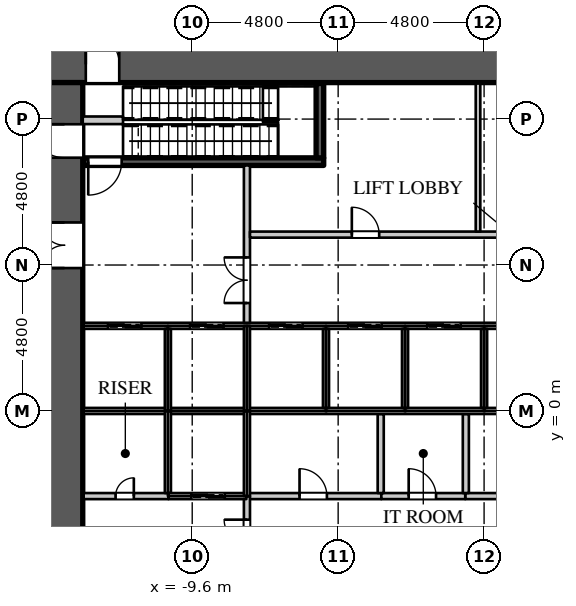
"""IFC4 building model, lengths in metres.
Left out: names, types, materials, properties, quantities, classifications, styles, units other than length and angle.
Written with IfcOpenShell. Run it as: python <this file> out.ifc"""

import sys

from ifc_helpers import new_model, si_unit, direction, frame, frame_2d, origin, place, context, subcontext, project, spatial, rectangle, extrude, element, fill, save


model = new_model("IFC4")
c1 = context("Model", 3, precision=1e-05, world=origin(), true_north=direction((0.0, 1.0)))
c2 = subcontext(c1, "Body", "Model", "MODEL_VIEW")
j1 = project(units=[si_unit("LENGTHUNIT", "METRE"), si_unit("PLANEANGLEUNIT", "RADIAN")], contexts=[c1])
p1 = place(None, origin())
s1 = spatial("IfcSite", under=j1, at=p1, CompositionType="ELEMENT")
p2 = place(p1, origin())
s2 = spatial("IfcBuilding", under=s1, at=p2, CompositionType="ELEMENT")
p3 = place(p2, origin())
s3 = spatial("IfcBuildingStorey", under=s2, at=p3, CompositionType="ELEMENT", Elevation=0.0)
p4 = place(p3, frame((-14.4, 11.4, 0.0), z_axis=(0.0, 0.0, 1.0), x_axis=(1.0, 0.0, 0.0)))
e1 = element("IfcWall", 1, at=p4, inside=s3, PredefinedType="SHEAR", context=c2, shape_type="SweptSolid", body=[
    extrude(rectangle(XDim=28.8, YDim=1.2, at=frame_2d((14.4, 0.0))), origin(), (0.0, 0.0, 1.0), 6.0),
])
p5 = place(p4, frame((1.3, 0.0, 0.0)))
e2 = element("IfcOpeningElement", 2, at=p5, cuts=e1, PredefinedType="OPENING", context=c2, shape_type="SweptSolid", body=[
    extrude(rectangle(XDim=1.1, YDim=2.2, at=frame_2d((0.55, 1.1))), frame((0.0, 0.61, 0.0), z_axis=(0.0, -1.0, 0.0), x_axis=(1.0, 0.0, 0.0)), (0.0, 0.0, 1.0), 1.22),
])
p6 = place(p4, frame((26.4, 0.0, 0.0)))
e3 = element("IfcOpeningElement", 3, at=p6, cuts=e1, PredefinedType="OPENING", context=c2, shape_type="SweptSolid", body=[
    extrude(rectangle(XDim=1.1, YDim=2.2, at=frame_2d((0.55, 1.1))), frame((0.0, 0.61, 0.0), z_axis=(0.0, -1.0, 0.0), x_axis=(1.0, 0.0, 0.0)), (0.0, 0.0, 1.0), 1.22),
])
p7 = place(p3, frame((-13.8, -10.8, 0.0), z_axis=(0.0, 0.0, 1.0), x_axis=(0.0, 1.0, 0.0)))
e4 = element("IfcWall", 4, at=p7, inside=s3, PredefinedType="SHEAR", context=c2, shape_type="SweptSolid", body=[
    extrude(rectangle(XDim=21.6, YDim=1.2, at=frame_2d((10.8, 0.0))), origin(), (0.0, 0.0, 1.0), 6.0),
])
p8 = place(p7, frame((15.5, 0.0, 0.0)))
e5 = element("IfcOpeningElement", 5, at=p8, cuts=e4, PredefinedType="OPENING", context=c2, shape_type="SweptSolid", body=[
    extrude(rectangle(XDim=1.5, YDim=2.4, at=frame_2d((0.75, 1.2))), frame((0.0, 0.61, 0.0), z_axis=(0.0, -1.0, 0.0), x_axis=(1.0, 0.0, 0.0)), (0.0, 0.0, 1.0), 1.22),
])
p9 = place(p7, frame((4.5, 0.0, 0.0)))
e6 = element("IfcOpeningElement", 6, at=p9, cuts=e4, PredefinedType="OPENING", context=c2, shape_type="SweptSolid", body=[
    extrude(rectangle(XDim=1.5, YDim=2.4, at=frame_2d((0.75, 1.2))), frame((0.0, 0.61, 0.0), z_axis=(0.0, -1.0, 0.0), x_axis=(1.0, 0.0, 0.0)), (0.0, 0.0, 1.0), 1.22),
])
p10 = place(p7, frame((19.13, 0.0, 0.0)))
e7 = element("IfcOpeningElement", 7, at=p10, cuts=e4, PredefinedType="OPENING", context=c2, shape_type="SweptSolid", body=[
    extrude(rectangle(XDim=1.1, YDim=2.2, at=frame_2d((0.55, 1.1))), frame((0.0, 0.61, 0.0), z_axis=(0.0, -1.0, 0.0), x_axis=(1.0, 0.0, 0.0)), (0.0, 0.0, 1.0), 1.22),
])
p11 = place(p3, frame((-7.82, -2.8, 0.0), z_axis=(0.0, 0.0, 1.0), x_axis=(1.0, 0.0, 0.0)))
e8 = element("IfcWall", 8, at=p11, inside=s3, PredefinedType="PARTITIONING", context=c2, shape_type="SweptSolid", body=[
    extrude(rectangle(XDim=4.44, YDim=0.2, at=frame_2d((2.22, 0.0))), origin(), (0.0, 0.0, 1.0), 5.65),
])
p12 = place(p11, frame((1.75, 0.0, 0.0)))
e9 = element("IfcOpeningElement", 9, at=p12, cuts=e8, PredefinedType="OPENING", context=c2, shape_type="SweptSolid", body=[
    extrude(rectangle(XDim=0.9, YDim=2.2, at=frame_2d((0.45, 1.1))), frame((0.0, 0.11, 0.0), z_axis=(0.0, -1.0, 0.0), x_axis=(1.0, 0.0, 0.0)), (0.0, 0.0, 1.0), 0.22),
])
p13 = place(p3, frame((-7.8, -8.075, 0.0), z_axis=(0.0, 0.0, 1.0), x_axis=(0.0, 1.0, 0.0)))
e10 = element("IfcWall", 10, at=p13, inside=s3, PredefinedType="PARTITIONING", context=c2, shape_type="SweptSolid", body=[
    extrude(rectangle(XDim=5.275, YDim=0.2, at=frame_2d((2.637, 0.0))), origin(), (0.0, 0.0, 1.0), 5.65),
])
p14 = place(p13, frame((3.0, 0.0, 0.0)))
e11 = element("IfcOpeningElement", 11, at=p14, cuts=e10, PredefinedType="OPENING", context=c2, shape_type="SweptSolid", body=[
    extrude(rectangle(XDim=1.5, YDim=2.4, at=frame_2d((0.75, 1.2))), frame((0.0, 0.11, 0.0), z_axis=(0.0, -1.0, 0.0), x_axis=(1.0, 0.0, 0.0)), (0.0, 0.0, 1.0), 0.22),
])
p15 = place(p3, frame((-7.8, 2.8, 0.0), z_axis=(0.0, 0.0, 1.0), x_axis=(0.0, 1.0, 0.0)))
e12 = element("IfcWall", 12, at=p15, inside=s3, PredefinedType="PARTITIONING", context=c2, shape_type="SweptSolid", body=[
    extrude(rectangle(XDim=5.275, YDim=0.2, at=frame_2d((2.637, 0.0))), origin(), (0.0, 0.0, 1.0), 5.65),
])
p16 = place(p15, frame((0.75, 0.0, 0.0)))
e13 = element("IfcOpeningElement", 13, at=p16, cuts=e12, PredefinedType="OPENING", context=c2, shape_type="SweptSolid", body=[
    extrude(rectangle(XDim=1.5, YDim=2.4, at=frame_2d((0.75, 1.2))), frame((0.0, 0.11, 0.0), z_axis=(0.0, -1.0, 0.0), x_axis=(1.0, 0.0, 0.0)), (0.0, 0.0, 1.0), 0.22),
])
p17 = place(p3, frame((-7.7, 5.8, 0.0), z_axis=(0.0, 0.0, 1.0), x_axis=(1.0, 0.0, 0.0)))
e14 = element("IfcWall", 14, at=p17, inside=s3, PredefinedType="PARTITIONING", context=c2, shape_type="SweptSolid", body=[
    extrude(rectangle(XDim=20.87, YDim=0.2, at=frame_2d((10.435, 0.0))), origin(), (0.0, 0.0, 1.0), 5.65),
])
p18 = place(p17, frame((3.35, 0.0, 0.0)))
e15 = element("IfcOpeningElement", 15, at=p18, cuts=e14, PredefinedType="OPENING", context=c2, shape_type="SweptSolid", body=[
    extrude(rectangle(XDim=0.9, YDim=2.2, at=frame_2d((0.45, 1.1))), frame((0.0, 0.11, 0.0), z_axis=(0.0, -1.0, 0.0), x_axis=(1.0, 0.0, 0.0)), (0.0, 0.0, 1.0), 0.22),
])
p19 = place(p17, frame((9.5, 0.0, 0.0)))
e16 = element("IfcOpeningElement", 16, at=p19, cuts=e14, PredefinedType="OPENING", context=c2, shape_type="SweptSolid", body=[
    extrude(rectangle(XDim=0.9, YDim=2.2, at=frame_2d((0.45, 1.1))), frame((0.0, 0.11, 0.0), z_axis=(0.0, -1.0, 0.0), x_axis=(1.0, 0.0, 0.0)), (0.0, 0.0, 1.0), 0.22),
])
p20 = place(p17, frame((16.15, 0.0, 0.0)))
e17 = element("IfcOpeningElement", 17, at=p20, cuts=e14, PredefinedType="OPENING", context=c2, shape_type="SweptSolid", body=[
    extrude(rectangle(XDim=0.9, YDim=2.2, at=frame_2d((0.45, 1.1))), frame((0.0, 0.11, 0.0), z_axis=(0.0, -1.0, 0.0), x_axis=(1.0, 0.0, 0.0)), (0.0, 0.0, 1.0), 0.22),
])
p21 = place(p3, frame((-0.62, -2.8, 0.0), z_axis=(0.0, 0.0, 1.0), x_axis=(1.0, 0.0, 0.0)))
e18 = element("IfcWall", 18, at=p21, inside=s3, PredefinedType="PARTITIONING", context=c2, shape_type="SweptSolid", body=[
    extrude(rectangle(XDim=8.44, YDim=0.2, at=frame_2d((4.22, 0.0))), origin(), (0.0, 0.0, 1.0), 5.65),
])
p22 = place(p21, frame((2.15, 0.0, 0.0)))
e19 = element("IfcOpeningElement", 19, at=p22, cuts=e18, PredefinedType="OPENING", context=c2, shape_type="SweptSolid", body=[
    extrude(rectangle(XDim=0.9, YDim=2.2, at=frame_2d((0.45, 1.1))), frame((0.0, 0.11, 0.0), z_axis=(0.0, -1.0, 0.0), x_axis=(1.0, 0.0, 0.0)), (0.0, 0.0, 1.0), 0.22),
])
p23 = place(p21, frame((6.2, 0.0, 0.0)))
e20 = element("IfcOpeningElement", 20, at=p23, cuts=e18, PredefinedType="OPENING", context=c2, shape_type="SweptSolid", body=[
    extrude(rectangle(XDim=0.9, YDim=2.2, at=frame_2d((0.45, 1.1))), frame((0.0, 0.11, 0.0), z_axis=(0.0, -1.0, 0.0), x_axis=(1.0, 0.0, 0.0)), (0.0, 0.0, 1.0), 0.22),
])
p24 = place(p3, frame((-0.2, 5.9, 0.0), z_axis=(0.0, 0.0, 1.0), x_axis=(0.0, 1.0, 0.0)))
e21 = element("IfcWall", 21, at=p24, inside=s3, PredefinedType="PARTITIONING", context=c2, shape_type="SweptSolid", body=[
    extrude(rectangle(XDim=4.87, YDim=0.15, at=frame_2d((2.435, 0.0))), origin(), (0.0, 0.0, 1.0), 5.65),
])
p25 = place(p3, frame((-13.17, -2.8, 0.0), z_axis=(0.0, 0.0, 1.0), x_axis=(1.0, 0.0, 0.0)))
e22 = element("IfcWall", 22, at=p25, inside=s3, PredefinedType="PARTITIONING", context=c2, shape_type="SweptSolid", body=[
    extrude(rectangle(XDim=2.79, YDim=0.2, at=frame_2d((1.395, 0.0))), origin(), (0.0, 0.0, 1.0), 5.65),
])
p26 = place(p25, frame((1.05, 0.0, 0.0)))
e23 = element("IfcOpeningElement", 23, at=p26, cuts=e22, PredefinedType="OPENING", context=c2, shape_type="SweptSolid", body=[
    extrude(rectangle(XDim=0.6, YDim=2.0, at=frame_2d((0.3, 1.0))), frame((0.0, 0.11, 0.0), z_axis=(0.0, -1.0, 0.0), x_axis=(1.0, 0.0, 0.0)), (0.0, 0.0, 1.0), 0.22),
])
p27 = place(p3, frame((-3.38, -2.8, 0.0), z_axis=(0.0, 0.0, 1.0), x_axis=(1.0, 0.0, 0.0)))
e24 = element("IfcWall", 24, at=p27, inside=s3, PredefinedType="PARTITIONING", context=c2, shape_type="SweptSolid", body=[
    extrude(rectangle(XDim=2.76, YDim=0.2, at=frame_2d((1.38, 0.0))), origin(), (0.0, 0.0, 1.0), 5.65),
])
p28 = place(p27, frame((0.9, 0.0, 0.0)))
e25 = element("IfcOpeningElement", 25, at=p28, cuts=e24, PredefinedType="OPENING", context=c2, shape_type="SweptSolid", body=[
    extrude(rectangle(XDim=0.9, YDim=2.2, at=frame_2d((0.45, 1.1))), frame((0.0, 0.11, 0.0), z_axis=(0.0, -1.0, 0.0), x_axis=(1.0, 0.0, 0.0)), (0.0, 0.0, 1.0), 0.22),
])
for number, where, z_axis, x_axis in (
    (26, (-3.4, -2.7, 0.0), (0.0, 0.0, 1.0), (0.0, 1.0, 0.0)),
    (27, (-0.6, -2.7, 0.0), (0.0, 0.0, 1.0), (0.0, 1.0, 0.0)),
):
    element("IfcWall", number, at=place(p3, frame(where, z_axis=z_axis, x_axis=x_axis)), inside=s3, PredefinedType="PARTITIONING", context=c2, shape_type="SweptSolid", body=[
        extrude(rectangle(XDim=2.6, YDim=0.2, at=frame_2d((1.3, 0.0))), origin(), (0.0, 0.0, 1.0), 5.65),
    ])
p29 = place(p3, frame((-13.17, 0.0, 0.0), z_axis=(0.0, 0.0, 1.0), x_axis=(1.0, 0.0, 0.0)))
e28 = element("IfcWall", 28, at=p29, inside=s3, PredefinedType="PARTITIONING", context=c2, shape_type="SweptSolid", body=[
    extrude(rectangle(XDim=23.57, YDim=0.2, at=frame_2d((11.785, 0.0))), origin(), (0.0, 0.0, 1.0), 5.65),
])
p30 = place(p3, frame((-13.17, 2.8, 0.0), z_axis=(0.0, 0.0, 1.0), x_axis=(1.0, 0.0, 0.0)))
e29 = element("IfcWall", 29, at=p30, inside=s3, PredefinedType="PARTITIONING", context=c2, shape_type="SweptSolid", body=[
    extrude(rectangle(XDim=23.57, YDim=0.2, at=frame_2d((11.785, 0.0))), origin(), (0.0, 0.0, 1.0), 5.65),
])
p31 = place(p30, frame((0.8, 0.0, 0.0)))
e30 = element("IfcOpeningElement", 30, at=p31, cuts=e29, PredefinedType="OPENING", context=c2, shape_type="SweptSolid", body=[
    extrude(rectangle(XDim=1.1, YDim=2.2, at=frame_2d((0.55, 1.1))), frame((0.0, 0.11, 0.0), z_axis=(0.0, -1.0, 0.0), x_axis=(1.0, 0.0, 0.0)), (0.0, 0.0, 1.0), 0.22),
])
p32 = place(p30, frame((3.5, 0.0, 0.0)))
e31 = element("IfcOpeningElement", 31, at=p32, cuts=e29, PredefinedType="OPENING", context=c2, shape_type="SweptSolid", body=[
    extrude(rectangle(XDim=1.1, YDim=2.2, at=frame_2d((0.55, 1.1))), frame((0.0, 0.11, 0.0), z_axis=(0.0, -1.0, 0.0), x_axis=(1.0, 0.0, 0.0)), (0.0, 0.0, 1.0), 0.22),
])
p33 = place(p30, frame((6.1, 0.0, 0.0)))
e32 = element("IfcOpeningElement", 32, at=p33, cuts=e29, PredefinedType="OPENING", context=c2, shape_type="SweptSolid", body=[
    extrude(rectangle(XDim=1.1, YDim=2.2, at=frame_2d((0.55, 1.1))), frame((0.0, 0.11, 0.0), z_axis=(0.0, -1.0, 0.0), x_axis=(1.0, 0.0, 0.0)), (0.0, 0.0, 1.0), 0.22),
])
p34 = place(p30, frame((8.7, 0.0, 0.0)))
e33 = element("IfcOpeningElement", 33, at=p34, cuts=e29, PredefinedType="OPENING", context=c2, shape_type="SweptSolid", body=[
    extrude(rectangle(XDim=1.1, YDim=2.2, at=frame_2d((0.55, 1.1))), frame((0.0, 0.11, 0.0), z_axis=(0.0, -1.0, 0.0), x_axis=(1.0, 0.0, 0.0)), (0.0, 0.0, 1.0), 0.22),
])
p35 = place(p30, frame((11.3, 0.0, 0.0)))
e34 = element("IfcOpeningElement", 34, at=p35, cuts=e29, PredefinedType="OPENING", context=c2, shape_type="SweptSolid", body=[
    extrude(rectangle(XDim=1.1, YDim=2.2, at=frame_2d((0.55, 1.1))), frame((0.0, 0.11, 0.0), z_axis=(0.0, -1.0, 0.0), x_axis=(1.0, 0.0, 0.0)), (0.0, 0.0, 1.0), 0.22),
])
p36 = place(p30, frame((13.9, 0.0, 0.0)))
e35 = element("IfcOpeningElement", 35, at=p36, cuts=e29, PredefinedType="OPENING", context=c2, shape_type="SweptSolid", body=[
    extrude(rectangle(XDim=1.1, YDim=2.2, at=frame_2d((0.55, 1.1))), frame((0.0, 0.11, 0.0), z_axis=(0.0, -1.0, 0.0), x_axis=(1.0, 0.0, 0.0)), (0.0, 0.0, 1.0), 0.22),
])
p37 = place(p30, frame((16.5, 0.0, 0.0)))
e36 = element("IfcOpeningElement", 36, at=p37, cuts=e29, PredefinedType="OPENING", context=c2, shape_type="SweptSolid", body=[
    extrude(rectangle(XDim=1.1, YDim=2.2, at=frame_2d((0.55, 1.1))), frame((0.0, 0.11, 0.0), z_axis=(0.0, -1.0, 0.0), x_axis=(1.0, 0.0, 0.0)), (0.0, 0.0, 1.0), 0.22),
])
p38 = place(p30, frame((19.1, 0.0, 0.0)))
e37 = element("IfcOpeningElement", 37, at=p38, cuts=e29, PredefinedType="OPENING", context=c2, shape_type="SweptSolid", body=[
    extrude(rectangle(XDim=1.1, YDim=2.2, at=frame_2d((0.55, 1.1))), frame((0.0, 0.11, 0.0), z_axis=(0.0, -1.0, 0.0), x_axis=(1.0, 0.0, 0.0)), (0.0, 0.0, 1.0), 0.22),
])
p39 = place(p30, frame((21.7, 0.0, 0.0)))
e38 = element("IfcOpeningElement", 38, at=p39, cuts=e29, PredefinedType="OPENING", context=c2, shape_type="SweptSolid", body=[
    extrude(rectangle(XDim=1.1, YDim=2.2, at=frame_2d((0.55, 1.1))), frame((0.0, 0.11, 0.0), z_axis=(0.0, -1.0, 0.0), x_axis=(1.0, 0.0, 0.0)), (0.0, 0.0, 1.0), 0.22),
])
p40 = place(p3, frame((-10.4, -2.7, 0.0), z_axis=(0.0, 0.0, 1.0), x_axis=(0.0, 1.0, 0.0)))
e39 = element("IfcWall", 39, at=p40, inside=s3, PredefinedType="PARTITIONING", context=c2, shape_type="SweptSolid", body=[
    extrude(rectangle(XDim=2.7, YDim=0.2, at=frame_2d((1.35, 0.0))), origin(), (0.0, 0.0, 1.0), 5.65),
])
p41 = place(p3, frame((-10.38, -2.8, 0.0), z_axis=(0.0, 0.0, 1.0), x_axis=(1.0, 0.0, 0.0)))
e40 = element("IfcWall", 40, at=p41, inside=s3, PredefinedType="PARTITIONING", context=c2, shape_type="SweptSolid", body=[
    extrude(rectangle(XDim=2.56, YDim=0.2, at=frame_2d((1.28, 0.0))), origin(), (0.0, 0.0, 1.0), 5.65),
])
p42 = place(p41, frame((0.75, 0.0, 0.0)))
e41 = element("IfcOpeningElement", 41, at=p42, cuts=e40, PredefinedType="OPENING", context=c2, shape_type="SweptSolid", body=[
    extrude(rectangle(XDim=1.1, YDim=2.2, at=frame_2d((0.55, 1.1))), frame((0.0, 0.11, 0.0), z_axis=(0.0, -1.0, 0.0), x_axis=(1.0, 0.0, 0.0)), (0.0, 0.0, 1.0), 0.22),
])
p43 = place(p3, frame((-10.4, 0.0, 0.0), z_axis=(0.0, 0.0, 1.0), x_axis=(0.0, 1.0, 0.0)))
e42 = element("IfcWall", 42, at=p43, inside=s3, PredefinedType="PARTITIONING", context=c2, shape_type="SweptSolid", body=[
    extrude(rectangle(XDim=2.7, YDim=0.2, at=frame_2d((1.35, 0.0))), origin(), (0.0, 0.0, 1.0), 5.65),
])
for number, where, z_axis, x_axis in (
    (43, (-7.8, -2.8, 0.0), (0.0, 0.0, 1.0), (0.0, 1.0, 0.0)),
    (44, (-7.8, 0.0, 0.0), (0.0, 0.0, 1.0), (0.0, 1.0, 0.0)),
):
    element("IfcWall", number, at=place(p3, frame(where, z_axis=z_axis, x_axis=x_axis)), inside=s3, PredefinedType="PARTITIONING", context=c2, shape_type="SweptSolid", body=[
        extrude(rectangle(XDim=2.8, YDim=0.2, at=frame_2d((1.4, 0.0))), origin(), (0.0, 0.0, 1.0), 5.65),
    ])
for number, where, z_axis, x_axis in (
    (45, (-5.2, 0.1, 0.0), (0.0, 0.0, 1.0), (0.0, 1.0, 0.0)),
    (46, (-2.6, 0.1, 0.0), (0.0, 0.0, 1.0), (0.0, 1.0, 0.0)),
    (47, (0.0, 0.1, 0.0), (0.0, 0.0, 1.0), (0.0, 1.0, 0.0)),
):
    element("IfcWall", number, at=place(p3, frame(where, z_axis=z_axis, x_axis=x_axis)), inside=s3, PredefinedType="PARTITIONING", context=c2, shape_type="SweptSolid", body=[
        extrude(rectangle(XDim=2.6, YDim=0.2, at=frame_2d((1.3, 0.0))), origin(), (0.0, 0.0, 1.0), 5.65),
    ])
p44 = place(p3, frame((-13.17, 8.2, 0.0), z_axis=(0.0, 0.0, 1.0), x_axis=(1.0, 0.0, 0.0)))
e48 = element("IfcWall", 48, at=p44, inside=s3, PredefinedType="SHEAR", context=c2, shape_type="SweptSolid", body=[
    extrude(rectangle(XDim=7.895, YDim=0.25, at=frame_2d((3.948, 0.0))), origin(), (0.0, 0.0, 1.0), 5.65),
])
p45 = place(p44, frame((0.15, 0.0, 0.0)))
e49 = element("IfcOpeningElement", 49, at=p45, cuts=e48, PredefinedType="OPENING", context=c2, shape_type="SweptSolid", body=[
    extrude(rectangle(XDim=1.1, YDim=2.2, at=frame_2d((0.55, 1.1))), frame((0.0, 0.135, 0.0), z_axis=(0.0, -1.0, 0.0), x_axis=(1.0, 0.0, 0.0)), (0.0, 0.0, 1.0), 0.27),
])
p46 = place(p3, frame((-5.4, 8.325, 0.0), z_axis=(0.0, 0.0, 1.0), x_axis=(0.0, 1.0, 0.0)))
e50 = element("IfcWall", 50, at=p46, inside=s3, PredefinedType="SHEAR", context=c2, shape_type="SweptSolid", body=[
    extrude(rectangle(XDim=2.445, YDim=0.25, at=frame_2d((1.223, 0.0))), origin(), (0.0, 0.0, 1.0), 5.65),
])
p47 = place(p3, frame((-13.2, 9.56, 0.0), z_axis=(0.0, 0.0, 1.0), x_axis=(1.0, 0.0, 0.0)))
e51 = element("IfcWall", 51, at=p47, inside=s3, PredefinedType="PARTITIONING", context=c2, shape_type="SweptSolid", body=[
    extrude(rectangle(XDim=1.325, YDim=0.25, at=frame_2d((0.663, 0.0))), origin(), (0.0, 0.0, 1.0), 5.65),
])
p48 = place(p26, origin())
e52 = element("IfcDoor", 52, at=p48, inside=s3, OperationType="SINGLE_SWING_RIGHT", PredefinedType="DOOR", context=c2, shape_type="SweptSolid", body=[
    extrude(rectangle(XDim=0.6, YDim=2.0, at=frame_2d((0.3, 1.0))), frame((0.0, 0.025, 0.0), z_axis=(0.0, -1.0, 0.0), x_axis=(1.0, 0.0, 0.0)), (0.0, 0.0, 1.0), 0.05),
])
fill(e23, e52)
p49 = place(p18, origin())
e53 = element("IfcDoor", 53, at=p49, inside=s3, OperationType="SINGLE_SWING_LEFT", PredefinedType="DOOR", context=c2, shape_type="SweptSolid", body=[
    extrude(rectangle(XDim=0.9, YDim=2.2, at=frame_2d((0.45, 1.1))), frame((0.0, 0.025, 0.0), z_axis=(0.0, -1.0, 0.0), x_axis=(1.0, 0.0, 0.0)), (0.0, 0.0, 1.0), 0.05),
])
fill(e15, e53)
p50 = place(p12, origin())
e54 = element("IfcDoor", 54, at=p50, inside=s3, OperationType="SINGLE_SWING_LEFT", PredefinedType="DOOR", context=c2, shape_type="SweptSolid", body=[
    extrude(rectangle(XDim=0.9, YDim=2.2, at=frame_2d((0.45, 1.1))), frame((0.0, 0.025, 0.0), z_axis=(0.0, -1.0, 0.0), x_axis=(1.0, 0.0, 0.0)), (0.0, 0.0, 1.0), 0.05),
])
fill(e9, e54)
p51 = place(p28, origin())
e55 = element("IfcDoor", 55, at=p51, inside=s3, OperationType="SINGLE_SWING_LEFT", PredefinedType="DOOR", context=c2, shape_type="SweptSolid", body=[
    extrude(rectangle(XDim=0.9, YDim=2.2, at=frame_2d((0.45, 1.1))), frame((0.0, 0.025, 0.0), z_axis=(0.0, -1.0, 0.0), x_axis=(1.0, 0.0, 0.0)), (0.0, 0.0, 1.0), 0.05),
])
fill(e25, e55)
p52 = place(p31, origin())
e56 = element("IfcDoor", 56, at=p52, inside=s3, OperationType="DOUBLE_DOOR_SLIDING", PredefinedType="DOOR", context=c2, shape_type="SweptSolid", body=[
    extrude(rectangle(XDim=1.1, YDim=2.2, at=frame_2d((0.55, 1.1))), frame((0.0, 0.025, 0.0), z_axis=(0.0, -1.0, 0.0), x_axis=(1.0, 0.0, 0.0)), (0.0, 0.0, 1.0), 0.05),
])
fill(e30, e56)
p53 = place(p32, origin())
e57 = element("IfcDoor", 57, at=p53, inside=s3, OperationType="DOUBLE_DOOR_SLIDING", PredefinedType="DOOR", context=c2, shape_type="SweptSolid", body=[
    extrude(rectangle(XDim=1.1, YDim=2.2, at=frame_2d((0.55, 1.1))), frame((0.0, 0.025, 0.0), z_axis=(0.0, -1.0, 0.0), x_axis=(1.0, 0.0, 0.0)), (0.0, 0.0, 1.0), 0.05),
])
fill(e31, e57)
p54 = place(p42, origin())
e58 = element("IfcDoor", 58, at=p54, inside=s3, OperationType="DOUBLE_DOOR_SLIDING", PredefinedType="DOOR", context=c2, shape_type="SweptSolid", body=[
    extrude(rectangle(XDim=1.1, YDim=2.2, at=frame_2d((0.55, 1.1))), frame((0.0, 0.025, 0.0), z_axis=(0.0, -1.0, 0.0), x_axis=(1.0, 0.0, 0.0)), (0.0, 0.0, 1.0), 0.05),
])
fill(e41, e58)
p55 = place(p33, origin())
e59 = element("IfcDoor", 59, at=p55, inside=s3, OperationType="DOUBLE_DOOR_SLIDING", PredefinedType="DOOR", context=c2, shape_type="SweptSolid", body=[
    extrude(rectangle(XDim=1.1, YDim=2.2, at=frame_2d((0.55, 1.1))), frame((0.0, 0.025, 0.0), z_axis=(0.0, -1.0, 0.0), x_axis=(1.0, 0.0, 0.0)), (0.0, 0.0, 1.0), 0.05),
])
fill(e32, e59)
p56 = place(p34, origin())
e60 = element("IfcDoor", 60, at=p56, inside=s3, OperationType="DOUBLE_DOOR_SLIDING", PredefinedType="DOOR", context=c2, shape_type="SweptSolid", body=[
    extrude(rectangle(XDim=1.1, YDim=2.2, at=frame_2d((0.55, 1.1))), frame((0.0, 0.025, 0.0), z_axis=(0.0, -1.0, 0.0), x_axis=(1.0, 0.0, 0.0)), (0.0, 0.0, 1.0), 0.05),
])
fill(e33, e60)
p57 = place(p35, origin())
e61 = element("IfcDoor", 61, at=p57, inside=s3, OperationType="DOUBLE_DOOR_SLIDING", PredefinedType="DOOR", context=c2, shape_type="SweptSolid", body=[
    extrude(rectangle(XDim=1.1, YDim=2.2, at=frame_2d((0.55, 1.1))), frame((0.0, 0.025, 0.0), z_axis=(0.0, -1.0, 0.0), x_axis=(1.0, 0.0, 0.0)), (0.0, 0.0, 1.0), 0.05),
])
fill(e34, e61)
p58 = place(p45, origin())
e62 = element("IfcDoor", 62, at=p58, inside=s3, OperationType="SINGLE_SWING_RIGHT", PredefinedType="DOOR", context=c2, shape_type="SweptSolid", body=[
    extrude(rectangle(XDim=1.1, YDim=2.2, at=frame_2d((0.55, 1.1))), frame((0.0, 0.025, 0.0), z_axis=(0.0, -1.0, 0.0), x_axis=(1.0, 0.0, 0.0)), (0.0, 0.0, 1.0), 0.05),
])
fill(e49, e62)
p59 = place(p16, origin())
e63 = element("IfcDoor", 63, at=p59, inside=s3, OperationType="DOUBLE_DOOR_SINGLE_SWING", PredefinedType="DOOR", context=c2, shape_type="SweptSolid", body=[
    extrude(rectangle(XDim=1.5, YDim=2.4, at=frame_2d((0.75, 1.2))), frame((0.0, 0.025, 0.0), z_axis=(0.0, -1.0, 0.0), x_axis=(1.0, 0.0, 0.0)), (0.0, 0.0, 1.0), 0.05),
])
fill(e13, e63)
p60 = place(p14, origin())
e64 = element("IfcDoor", 64, at=p60, inside=s3, OperationType="DOUBLE_DOOR_SINGLE_SWING", PredefinedType="DOOR", context=c2, shape_type="SweptSolid", body=[
    extrude(rectangle(XDim=1.5, YDim=2.4, at=frame_2d((0.75, 1.2))), frame((0.0, 0.025, 0.0), z_axis=(0.0, -1.0, 0.0), x_axis=(1.0, 0.0, 0.0)), (0.0, 0.0, 1.0), 0.05),
])
fill(e11, e64)
p61 = place(p8, origin())
e65 = element("IfcDoor", 65, at=p61, inside=s3, OperationType="DOUBLE_DOOR_SINGLE_SWING", PredefinedType="DOOR", context=c2, shape_type="SweptSolid", body=[
    extrude(rectangle(XDim=1.5, YDim=2.4, at=frame_2d((0.75, 1.2))), frame((0.0, 0.025, 0.0), z_axis=(0.0, -1.0, 0.0), x_axis=(1.0, 0.0, 0.0)), (0.0, 0.0, 1.0), 0.05),
])
fill(e5, e65)
p62 = place(p5, origin())
e66 = element("IfcDoor", 66, at=p62, inside=s3, OperationType="SINGLE_SWING_LEFT", PredefinedType="DOOR", context=c2, shape_type="SweptSolid", body=[
    extrude(rectangle(XDim=1.1, YDim=2.2, at=frame_2d((0.55, 1.1))), frame((0.0, 0.025, 0.0), z_axis=(0.0, -1.0, 0.0), x_axis=(1.0, 0.0, 0.0)), (0.0, 0.0, 1.0), 0.05),
])
fill(e2, e66)
p63 = place(p10, origin())
e67 = element("IfcDoor", 67, at=p63, inside=s3, OperationType="SINGLE_SWING_RIGHT", PredefinedType="DOOR", context=c2, shape_type="SweptSolid", body=[
    extrude(rectangle(XDim=1.1, YDim=2.2, at=frame_2d((0.55, 1.1))), frame((0.0, 0.025, 0.0), z_axis=(0.0, -1.0, 0.0), x_axis=(1.0, 0.0, 0.0)), (0.0, 0.0, 1.0), 0.05),
])
fill(e7, e67)
save(model, sys.argv[1])
